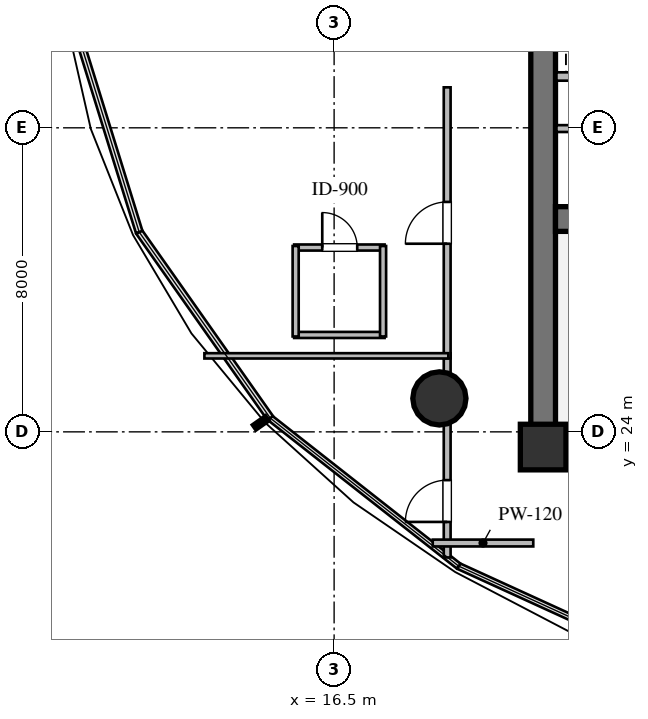
"""IFC4 building model, lengths in metres.
Left out: names, types, materials, properties, quantities, classifications, styles, units other than length and angle.
Written with IfcOpenShell. Run it as: python <this file> out.ifc"""

import sys

from ifc_helpers import new_model, si_unit, direction, frame, frame_2d, origin, origin_2d, place, context, subcontext, project, spatial, rectangle, circle, extrude, element, fill, save


model = new_model("IFC4")
c1 = context("Model", 3, precision=1e-05, world=origin(), true_north=direction((0.0, 1.0)))
c2 = subcontext(c1, "Body", "Model", "MODEL_VIEW")
j1 = project(units=[si_unit("LENGTHUNIT", "METRE"), si_unit("PLANEANGLEUNIT", "RADIAN")], contexts=[c1])
p1 = place(None, origin())
s1 = spatial("IfcSite", under=j1, at=p1, CompositionType="ELEMENT")
p2 = place(p1, origin())
s2 = spatial("IfcBuilding", under=s1, at=p2, CompositionType="ELEMENT")
p3 = place(p2, frame((0.0, 0.0, 31.2)))
s3 = spatial("IfcBuildingStorey", under=s2, at=p3, CompositionType="ELEMENT", Elevation=31.2)
p4 = place(p3, frame((21.675, 23.6, 0.0), z_axis=(0.0, 0.0, 1.0), x_axis=(1.0, 0.0, 0.0)))
e1 = element("IfcWall", 1, at=p4, inside=s3, PredefinedType="SHEAR", context=c2, shape_type="SweptSolid", body=[
    extrude(rectangle(XDim=22.65, YDim=0.65, at=frame_2d((11.325, 0.0))), origin(), (0.0, 0.0, 1.0), 3.36),
])
p5 = place(p3, frame((22.0, 23.925, 0.0), z_axis=(0.0, 0.0, 1.0), x_axis=(0.0, 1.0, 0.0)))
e2 = element("IfcWall", 2, at=p5, inside=s3, PredefinedType="SHEAR", context=c2, shape_type="SweptSolid", body=[
    extrude(rectangle(XDim=12.15, YDim=0.65, at=frame_2d((6.075, 0.0))), origin(), (0.0, 0.0, 1.0), 3.36),
])
p6 = place(p3, frame((22.325, 29.6, 0.0), z_axis=(0.0, 0.0, 1.0), x_axis=(1.0, 0.0, 0.0)))
e3 = element("IfcWall", 3, at=p6, inside=s3, PredefinedType="SHEAR", context=c2, shape_type="SweptSolid", body=[
    extrude(rectangle(XDim=21.35, YDim=0.65, at=frame_2d((10.675, 0.0))), origin(), (0.0, 0.0, 1.0), 3.36),
])
p7 = place(p6, frame((12.125, 0.0, 0.0)))
e4 = element("IfcOpeningElement", 4, at=p7, cuts=e3, PredefinedType="OPENING", context=c2, shape_type="SweptSolid", body=[
    extrude(rectangle(XDim=1.15, YDim=2.1, at=frame_2d((0.575, 1.05))), frame((0.0, 0.335, 0.0), z_axis=(0.0, -1.0, 0.0), x_axis=(1.0, 0.0, 0.0)), (0.0, 0.0, 1.0), 0.67),
])
p8 = place(p3, frame((22.0, 23.6, 0.0), z_axis=(0.0, 0.0, 1.0), x_axis=(1.0, 0.0, 0.0)))
e5 = element("IfcColumn", 5, at=p8, inside=s3, PredefinedType="COLUMN", context=c2, shape_type="SweptSolid", body=[
    extrude(rectangle(XDim=1.2, YDim=1.2, at=origin_2d()), origin(), (0.0, 0.0, 1.0), 3.6),
])
p9 = place(p3, frame((19.27, 24.88, 0.0), z_axis=(0.0, 0.0, 1.0), x_axis=(1.0, 0.0, 0.0)))
e6 = element("IfcColumn", 6, at=p9, inside=s3, PredefinedType="COLUMN", context=c2, shape_type="SweptSolid", body=[
    extrude(circle(Radius=0.7, at=origin_2d()), origin(), (0.0, 0.0, 1.0), 3.6),
])
p10 = place(p3, frame((22.35, 33.35, 0.0), z_axis=(0.0, 0.0, 1.0), x_axis=(1.0, 0.0, 0.0)))
e7 = element("IfcWall", 7, at=p10, inside=s3, PredefinedType="SOLIDWALL", context=c2, shape_type="SweptSolid", body=[
    extrude(rectangle(XDim=3.57, YDim=0.22, at=frame_2d((1.785, 0.0))), origin(), (0.0, 0.0, 1.0), 3.36),
])
p11 = place(p10, frame((2.213, 0.0, 0.0)))
e8 = element("IfcOpeningElement", 8, at=p11, cuts=e7, PredefinedType="OPENING", context=c2, shape_type="SweptSolid", body=[
    extrude(rectangle(XDim=1.2, YDim=2.1, at=frame_2d((0.6, 1.05))), frame((0.0, 0.12, 0.0), z_axis=(0.0, -1.0, 0.0), x_axis=(1.0, 0.0, 0.0)), (0.0, 0.0, 1.0), 0.24),
])
p12 = place(p3, frame((22.35, 31.98, 0.0), z_axis=(0.0, 0.0, 1.0), x_axis=(1.0, 0.0, 0.0)))
e9 = element("IfcWall", 9, at=p12, inside=s3, PredefinedType="PARTITIONING", context=c2, shape_type="SweptSolid", body=[
    extrude(rectangle(XDim=3.75, YDim=0.18, at=frame_2d((1.875, 0.0))), origin(), (0.0, 0.0, 1.0), 3.36),
])
p13 = place(p12, frame((1.425, 0.0, 0.0)))
e10 = element("IfcOpeningElement", 10, at=p13, cuts=e9, PredefinedType="OPENING", context=c2, shape_type="SweptSolid", body=[
    extrude(rectangle(XDim=0.92, YDim=2.1, at=frame_2d((0.46, 1.05))), frame((0.0, 0.1, 0.0), z_axis=(0.0, -1.0, 0.0), x_axis=(1.0, 0.0, 0.0)), (0.0, 0.0, 1.0), 0.2),
])
p14 = place(p3, frame((15.448, 26.55, 0.0), z_axis=(0.0, 0.0, 1.0), x_axis=(1.0, 0.0, 0.0)))
e11 = element("IfcWall", 11, at=p14, inside=s3, PredefinedType="PLUMBINGWALL", context=c2, shape_type="SweptSolid", body=[
    extrude(rectangle(XDim=2.38, YDim=0.16, at=frame_2d((1.19, 0.0))), origin(), (0.0, 0.0, 1.0), 3.36),
])
p15 = place(p3, frame((15.448, 28.85, 0.0), z_axis=(0.0, 0.0, 1.0), x_axis=(1.0, 0.0, 0.0)))
e12 = element("IfcWall", 12, at=p15, inside=s3, PredefinedType="PLUMBINGWALL", context=c2, shape_type="SweptSolid", body=[
    extrude(rectangle(XDim=2.38, YDim=0.16, at=frame_2d((1.19, 0.0))), origin(), (0.0, 0.0, 1.0), 3.36),
])
p16 = place(p15, frame((0.74, 0.0, 0.0)))
e13 = element("IfcOpeningElement", 13, at=p16, cuts=e12, PredefinedType="OPENING", context=c2, shape_type="SweptSolid", body=[
    extrude(rectangle(XDim=0.92, YDim=2.1, at=frame_2d((0.46, 1.05))), frame((0.0, 0.09, 0.0), z_axis=(0.0, -1.0, 0.0), x_axis=(1.0, 0.0, 0.0)), (0.0, 0.0, 1.0), 0.18),
])
p17 = place(p3, frame((15.488, 26.51, 0.0), z_axis=(0.0, 0.0, 1.0), x_axis=(0.0, 1.0, 0.0)))
e14 = element("IfcWall", 14, at=p17, inside=s3, PredefinedType="PLUMBINGWALL", context=c2, shape_type="SweptSolid", body=[
    extrude(rectangle(XDim=2.38, YDim=0.16, at=frame_2d((1.19, 0.0))), origin(), (0.0, 0.0, 1.0), 3.36),
])
p18 = place(p3, frame((17.788, 26.51, 0.0), z_axis=(0.0, 0.0, 1.0), x_axis=(0.0, 1.0, 0.0)))
e15 = element("IfcWall", 15, at=p18, inside=s3, PredefinedType="PLUMBINGWALL", context=c2, shape_type="SweptSolid", body=[
    extrude(rectangle(XDim=2.38, YDim=0.16, at=frame_2d((1.19, 0.0))), origin(), (0.0, 0.0, 1.0), 2.738),
])
p19 = place(p3, frame((19.475, 20.695, 0.0), z_axis=(0.0, 0.0, 1.0), x_axis=(0.0, 1.0, 0.0)))
e16 = element("IfcWall", 16, at=p19, inside=s3, PredefinedType="PARTITIONING", context=c2, shape_type="SweptSolid", body=[
    extrude(rectangle(XDim=5.37, YDim=0.18, at=frame_2d((2.685, 0.0))), origin(), (0.0, 0.0, 1.0), 2.738),
])
p20 = place(p19, frame((0.935, 0.0, 0.0)))
e17 = element("IfcOpeningElement", 17, at=p20, cuts=e16, PredefinedType="OPENING", context=c2, shape_type="SweptSolid", body=[
    extrude(rectangle(XDim=1.1, YDim=2.1, at=frame_2d((0.55, 1.05))), frame((0.0, 0.1, 0.0), z_axis=(0.0, -1.0, 0.0), x_axis=(1.0, 0.0, 0.0)), (0.0, 0.0, 1.0), 0.2),
])
p21 = place(p3, frame((21.74, 21.075, 0.0), z_axis=(0.0, 0.0, 1.0), x_axis=(-1.0, 0.0, 0.0)))
e18 = element("IfcWall", 18, at=p21, inside=s3, PredefinedType="PARTITIONING", context=c2, shape_type="SweptSolid", body=[
    extrude(rectangle(XDim=2.645, YDim=0.18, at=frame_2d((1.323, 0.0))), origin(), (0.0, 0.0, 1.0), 3.36),
])
p22 = place(p3, frame((19.475, 25.935, 0.0), z_axis=(0.0, 0.0, 1.0), x_axis=(0.0, 1.0, 0.0)))
e19 = element("IfcWall", 19, at=p22, inside=s3, PredefinedType="PARTITIONING", context=c2, shape_type="SweptSolid", body=[
    extrude(rectangle(XDim=7.13, YDim=0.18, at=frame_2d((3.565, 0.0))), origin(), (0.0, 0.0, 1.0), 2.738),
])
p23 = place(p22, frame((3.015, 0.0, 0.0)))
e20 = element("IfcOpeningElement", 20, at=p23, cuts=e19, PredefinedType="OPENING", context=c2, shape_type="SweptSolid", body=[
    extrude(rectangle(XDim=1.1, YDim=2.1, at=frame_2d((0.55, 1.05))), frame((0.0, 0.1, 0.0), z_axis=(0.0, -1.0, 0.0), x_axis=(1.0, 0.0, 0.0)), (0.0, 0.0, 1.0), 0.2),
])
p24 = place(p3, frame((13.087, 26.0, 0.0), z_axis=(0.0, 0.0, 1.0), x_axis=(1.0, 0.0, 0.0)))
e21 = element("IfcWall", 21, at=p24, inside=s3, PredefinedType="PARTITIONING", context=c2, shape_type="SweptSolid", body=[
    extrude(rectangle(XDim=6.418, YDim=0.14, at=frame_2d((3.209, 0.0))), origin(), (0.0, 0.0, 1.0), 3.36),
])
p25 = place(p16, origin())
e22 = element("IfcDoor", 22, at=p25, inside=s3, OperationType="SINGLE_SWING_LEFT", PredefinedType="DOOR", context=c2, shape_type="SweptSolid", body=[
    extrude(rectangle(XDim=0.92, YDim=2.1, at=frame_2d((0.46, 1.05))), frame((0.0, 0.025, 0.0), z_axis=(0.0, -1.0, 0.0), x_axis=(1.0, 0.0, 0.0)), (0.0, 0.0, 1.0), 0.05),
])
fill(e13, e22)
p26 = place(p20, origin())
e23 = element("IfcDoor", 23, at=p26, inside=s3, OperationType="SINGLE_SWING_LEFT", PredefinedType="DOOR", context=c2, shape_type="SweptSolid", body=[
    extrude(rectangle(XDim=1.1, YDim=2.1, at=frame_2d((0.55, 1.05))), frame((0.0, 0.025, 0.0), z_axis=(0.0, -1.0, 0.0), x_axis=(1.0, 0.0, 0.0)), (0.0, 0.0, 1.0), 0.05),
])
fill(e17, e23)
p27 = place(p23, origin())
e24 = element("IfcDoor", 24, at=p27, inside=s3, OperationType="SINGLE_SWING_LEFT", PredefinedType="DOOR", context=c2, shape_type="SweptSolid", body=[
    extrude(rectangle(XDim=1.1, YDim=2.1, at=frame_2d((0.55, 1.05))), frame((0.0, 0.025, 0.0), z_axis=(0.0, -1.0, 0.0), x_axis=(1.0, 0.0, 0.0)), (0.0, 0.0, 1.0), 0.05),
])
fill(e20, e24)
save(model, sys.argv[1])
